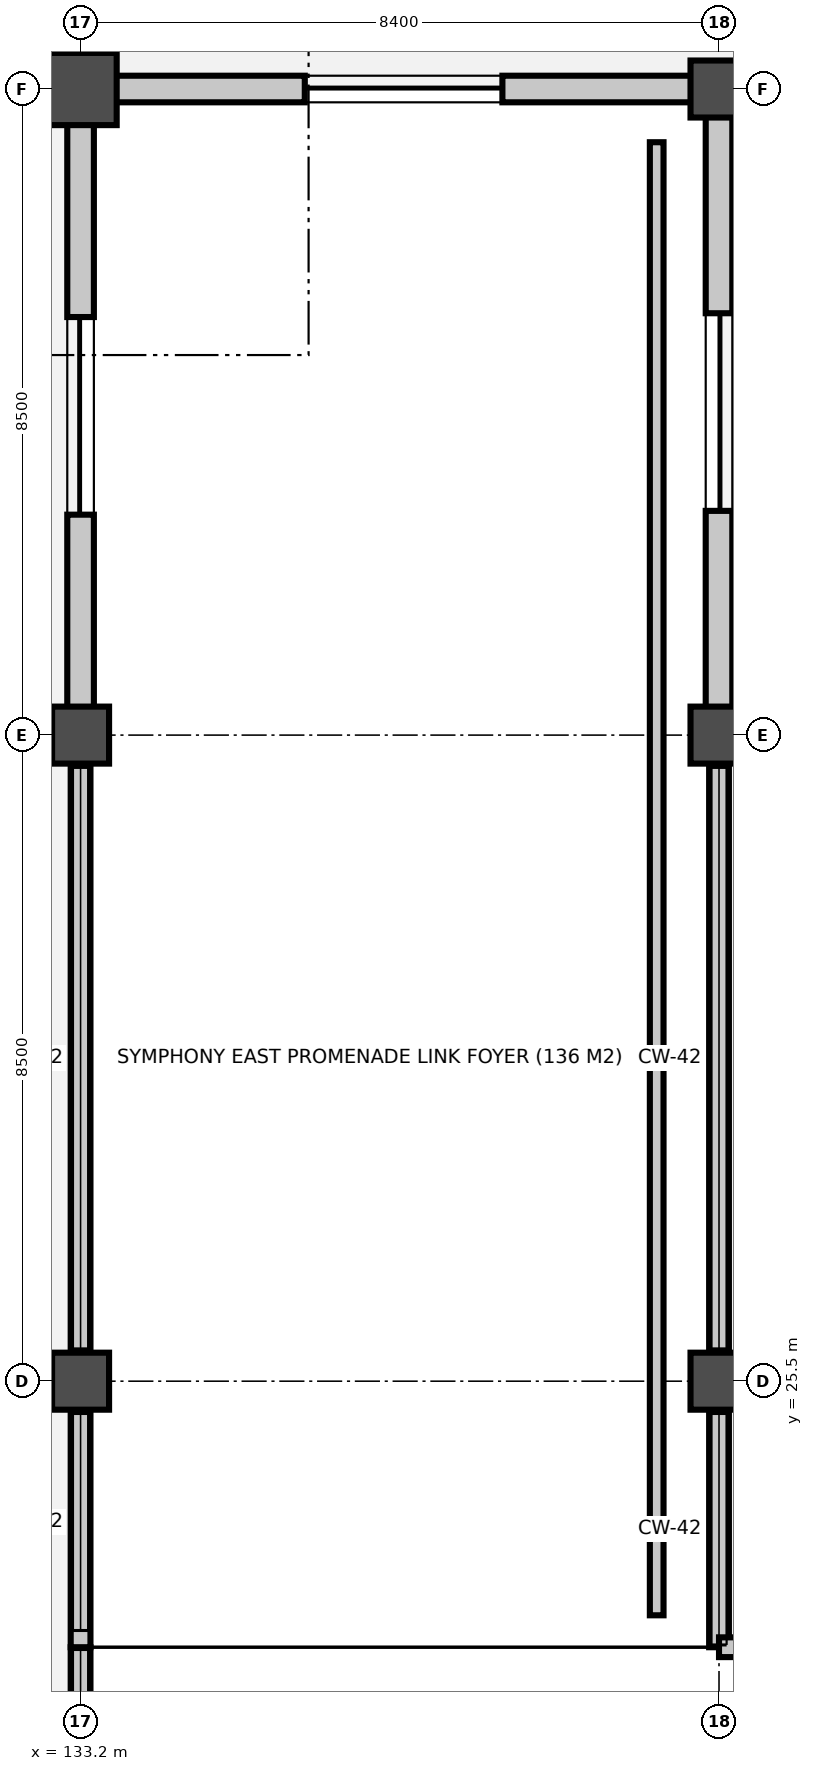
"""IFC4 building model, lengths in metres.
Left out: names, types, materials, properties, quantities, classifications, styles, units other than length and angle.
Written with IfcOpenShell. Run it as: python <this file> out.ifc"""

import sys

from ifc_helpers import new_model, si_unit, direction, frame, frame_2d, origin, origin_2d, place, context, subcontext, project, spatial, rectangle, extrude, element, fill, save


model = new_model("IFC4")
c1 = context("Model", 3, precision=1e-05, world=origin(), true_north=direction((0.0, 1.0)))
c2 = subcontext(c1, "Body", "Model", "MODEL_VIEW")
j1 = project(units=[si_unit("LENGTHUNIT", "METRE"), si_unit("PLANEANGLEUNIT", "RADIAN")], contexts=[c1])
p1 = place(None, origin())
s1 = spatial("IfcSite", under=j1, at=p1, CompositionType="ELEMENT")
p2 = place(p1, origin())
s2 = spatial("IfcBuilding", under=s1, at=p2, CompositionType="ELEMENT")
p3 = place(p2, origin())
s3 = spatial("IfcBuildingStorey", under=s2, at=p3, CompositionType="ELEMENT", Elevation=0.0)
for number, where, z_axis, x_axis in (
    (1, (133.2, 25.5, 0.0), (0.0, 0.0, 1.0), (1.0, 0.0, 0.0)),
    (2, (133.2, 34.0, 0.0), (0.0, 0.0, 1.0), (1.0, 0.0, 0.0)),
):
    element("IfcColumn", number, at=place(p3, frame(where, z_axis=z_axis, x_axis=x_axis)), inside=s3, PredefinedType="COLUMN", context=c2, shape_type="SweptSolid", body=[
        extrude(rectangle(XDim=0.75, YDim=0.75, at=origin_2d()), origin(), (0.0, 0.0, 1.0), 5.4),
    ])
p4 = place(p3, frame((133.2, 42.5, 0.0), z_axis=(0.0, 0.0, 1.0), x_axis=(1.0, 0.0, 0.0)))
e3 = element("IfcColumn", 3, at=p4, inside=s3, PredefinedType="COLUMN", context=c2, shape_type="SweptSolid", body=[
    extrude(rectangle(XDim=0.95, YDim=0.95, at=origin_2d()), origin(), (0.0, 0.0, 1.0), 5.4),
])
for number, where, z_axis, x_axis in (
    (4, (141.6, 25.5, 0.0), (0.0, 0.0, 1.0), (1.0, 0.0, 0.0)),
    (5, (141.6, 34.0, 0.0), (0.0, 0.0, 1.0), (1.0, 0.0, 0.0)),
    (6, (141.6, 42.5, 0.0), (0.0, 0.0, 1.0), (1.0, 0.0, 0.0)),
):
    element("IfcColumn", number, at=place(p3, frame(where, z_axis=z_axis, x_axis=x_axis)), inside=s3, PredefinedType="COLUMN", context=c2, shape_type="SweptSolid", body=[
        extrude(rectangle(XDim=0.75, YDim=0.75, at=origin_2d()), origin(), (0.0, 0.0, 1.0), 5.4),
    ])
p5 = place(p3, frame((133.2, 51.16, 0.0), z_axis=(0.0, 0.0, 1.0), x_axis=(0.0, -1.0, 0.0)))
e7 = element("IfcWall", 7, at=p5, inside=s3, PredefinedType="SOLIDWALL", context=c2, shape_type="SweptSolid", body=[
    extrude(rectangle(XDim=8.205, YDim=0.48, at=frame_2d((4.103, 0.0))), origin(), (0.0, 0.0, 1.0), 5.12),
])
p6 = place(p5, frame((3.302, 0.0, 0.95)))
e8 = element("IfcOpeningElement", 8, at=p6, cuts=e7, PredefinedType="OPENING", context=c2, shape_type="SweptSolid", body=[
    extrude(rectangle(XDim=1.6, YDim=2.2, at=frame_2d((0.8, 1.1))), frame((0.0, 0.25, 0.0), z_axis=(0.0, -1.0, 0.0), x_axis=(1.0, 0.0, 0.0)), (0.0, 0.0, 1.0), 0.5),
])
p7 = place(p3, frame((133.655, 42.5, 0.0), z_axis=(0.0, 0.0, 1.0), x_axis=(1.0, 0.0, 0.0)))
e9 = element("IfcWall", 9, at=p7, inside=s3, PredefinedType="SOLIDWALL", context=c2, shape_type="SweptSolid", body=[
    extrude(rectangle(XDim=7.59, YDim=0.35, at=frame_2d((3.795, 0.0))), origin(), (0.0, 0.0, 1.0), 4.516),
])
p8 = place(p7, frame((2.495, 0.0, 0.9)))
e10 = element("IfcOpeningElement", 10, at=p8, cuts=e9, PredefinedType="OPENING", context=c2, shape_type="SweptSolid", body=[
    extrude(rectangle(XDim=2.6, YDim=2.35, at=frame_2d((1.3, 1.175))), frame((0.0, 0.185, 0.0), z_axis=(0.0, -1.0, 0.0), x_axis=(1.0, 0.0, 0.0)), (0.0, 0.0, 1.0), 0.37),
])
p9 = place(p3, frame((141.6, 25.105, 0.0), z_axis=(0.0, 0.0, 1.0), x_axis=(0.0, -1.0, 0.0)))
e11 = element("IfcWall", 11, at=p9, inside=s3, PredefinedType="PARAPET", context=c2, shape_type="SweptSolid", body=[
    extrude(rectangle(XDim=3.105, YDim=0.26, at=frame_2d((1.552, 0.0))), origin(), (0.0, 0.0, 1.0), 1.12),
])
p10 = place(p3, frame((141.6, 33.605, 0.0), z_axis=(0.0, 0.0, 1.0), x_axis=(0.0, -1.0, 0.0)))
e12 = element("IfcWall", 12, at=p10, inside=s3, PredefinedType="PARAPET", context=c2, shape_type="SweptSolid", body=[
    extrude(rectangle(XDim=7.71, YDim=0.26, at=frame_2d((3.855, 0.0))), origin(), (0.0, 0.0, 1.0), 1.12),
])
p11 = place(p3, frame((141.6, 42.145, 0.0), z_axis=(0.0, 0.0, 1.0), x_axis=(0.0, -1.0, 0.0)))
e13 = element("IfcWall", 13, at=p11, inside=s3, PredefinedType="SOLIDWALL", context=c2, shape_type="SweptSolid", body=[
    extrude(rectangle(XDim=7.79, YDim=0.35, at=frame_2d((3.895, 0.0))), origin(), (0.0, 0.0, 1.0), 4.354),
])
p12 = place(p11, frame((2.595, 0.0, 0.9)))
e14 = element("IfcOpeningElement", 14, at=p12, cuts=e13, PredefinedType="OPENING", context=c2, shape_type="SweptSolid", body=[
    extrude(rectangle(XDim=2.6, YDim=2.35, at=frame_2d((1.3, 1.175))), frame((0.0, 0.185, 0.0), z_axis=(0.0, -1.0, 0.0), x_axis=(1.0, 0.0, 0.0)), (0.0, 0.0, 1.0), 0.37),
])
p13 = place(p3, frame((141.6, 22.0, 0.0), z_axis=(0.0, 0.0, 1.0), x_axis=(1.0, 0.0, 0.0)))
e15 = element("IfcWall", 15, at=p13, inside=s3, PredefinedType="PARAPET", context=c2, shape_type="SweptSolid", body=[
    extrude(rectangle(XDim=8.4, YDim=0.26, at=frame_2d((4.2, 0.0))), origin(), (0.0, 0.0, 1.0), 1.12),
])
p14 = place(p3, frame((133.2, 17.395, 0.0), z_axis=(0.0, 0.0, 1.0), x_axis=(0.0, 1.0, 0.0)))
e16 = element("IfcWall", 16, at=p14, inside=s3, PredefinedType="PARAPET", context=c2, shape_type="SweptSolid", body=[
    extrude(rectangle(XDim=4.605, YDim=0.26, at=frame_2d((2.302, 0.0))), origin(), (0.0, 0.0, 1.0), 1.12),
])
p15 = place(p3, frame((133.2, 22.0, 0.0), z_axis=(0.0, 0.0, 1.0), x_axis=(0.0, 1.0, 0.0)))
e17 = element("IfcWall", 17, at=p15, inside=s3, PredefinedType="PARAPET", context=c2, shape_type="SweptSolid", body=[
    extrude(rectangle(XDim=3.105, YDim=0.26, at=frame_2d((1.552, 0.0))), origin(), (0.0, 0.0, 1.0), 1.12),
])
p16 = place(p3, frame((133.2, 25.895, 0.0), z_axis=(0.0, 0.0, 1.0), x_axis=(0.0, 1.0, 0.0)))
e18 = element("IfcWall", 18, at=p16, inside=s3, PredefinedType="PARAPET", context=c2, shape_type="SweptSolid", body=[
    extrude(rectangle(XDim=7.71, YDim=0.26, at=frame_2d((3.855, 0.0))), origin(), (0.0, 0.0, 1.0), 1.12),
])
p17 = place(p3, frame((133.2, 34.355, 0.0), z_axis=(0.0, 0.0, 1.0), x_axis=(0.0, 1.0, 0.0)))
e19 = element("IfcWall", 19, at=p17, inside=s3, PredefinedType="SOLIDWALL", context=c2, shape_type="SweptSolid", body=[
    extrude(rectangle(XDim=7.69, YDim=0.35, at=frame_2d((3.845, 0.0))), origin(), (0.0, 0.0, 1.0), 4.431),
])
p18 = place(p17, frame((2.545, 0.0, 0.9)))
e20 = element("IfcOpeningElement", 20, at=p18, cuts=e19, PredefinedType="OPENING", context=c2, shape_type="SweptSolid", body=[
    extrude(rectangle(XDim=2.6, YDim=2.35, at=frame_2d((1.3, 1.175))), frame((0.0, 0.185, 0.0), z_axis=(0.0, -1.0, 0.0), x_axis=(1.0, 0.0, 0.0)), (0.0, 0.0, 1.0), 0.37),
])
p19 = place(p3, frame((140.78, 41.8, 0.0), z_axis=(0.0, 0.0, 1.0), x_axis=(0.0, -1.0, 0.0)))
e21 = element("IfcWall", 21, at=p19, inside=s3, PredefinedType="PARTITIONING", context=c2, shape_type="SweptSolid", body=[
    extrude(rectangle(XDim=19.38, YDim=0.18, at=frame_2d((9.69, 0.0))), origin(), (0.0, 0.0, 1.0), 4.04),
])
p20 = place(p8, origin())
e22 = element("IfcWindow", 22, at=p20, inside=s3, PartitioningType="SINGLE_PANEL", PredefinedType="WINDOW", context=c2, shape_type="SweptSolid", body=[
    extrude(rectangle(XDim=2.6, YDim=2.35, at=frame_2d((1.3, 1.175))), frame((0.0, 0.03, 0.0), z_axis=(0.0, -1.0, 0.0), x_axis=(1.0, 0.0, 0.0)), (0.0, 0.0, 1.0), 0.06),
])
fill(e10, e22)
p21 = place(p12, origin())
e23 = element("IfcWindow", 23, at=p21, inside=s3, PartitioningType="SINGLE_PANEL", PredefinedType="WINDOW", context=c2, shape_type="SweptSolid", body=[
    extrude(rectangle(XDim=2.6, YDim=2.35, at=frame_2d((1.3, 1.175))), frame((0.0, 0.03, 0.0), z_axis=(0.0, -1.0, 0.0), x_axis=(1.0, 0.0, 0.0)), (0.0, 0.0, 1.0), 0.06),
])
fill(e14, e23)
p22 = place(p18, origin())
e24 = element("IfcWindow", 24, at=p22, inside=s3, PartitioningType="SINGLE_PANEL", PredefinedType="WINDOW", context=c2, shape_type="SweptSolid", body=[
    extrude(rectangle(XDim=2.6, YDim=2.35, at=frame_2d((1.3, 1.175))), frame((0.0, 0.03, 0.0), z_axis=(0.0, -1.0, 0.0), x_axis=(1.0, 0.0, 0.0)), (0.0, 0.0, 1.0), 0.06),
])
fill(e20, e24)
save(model, sys.argv[1])
